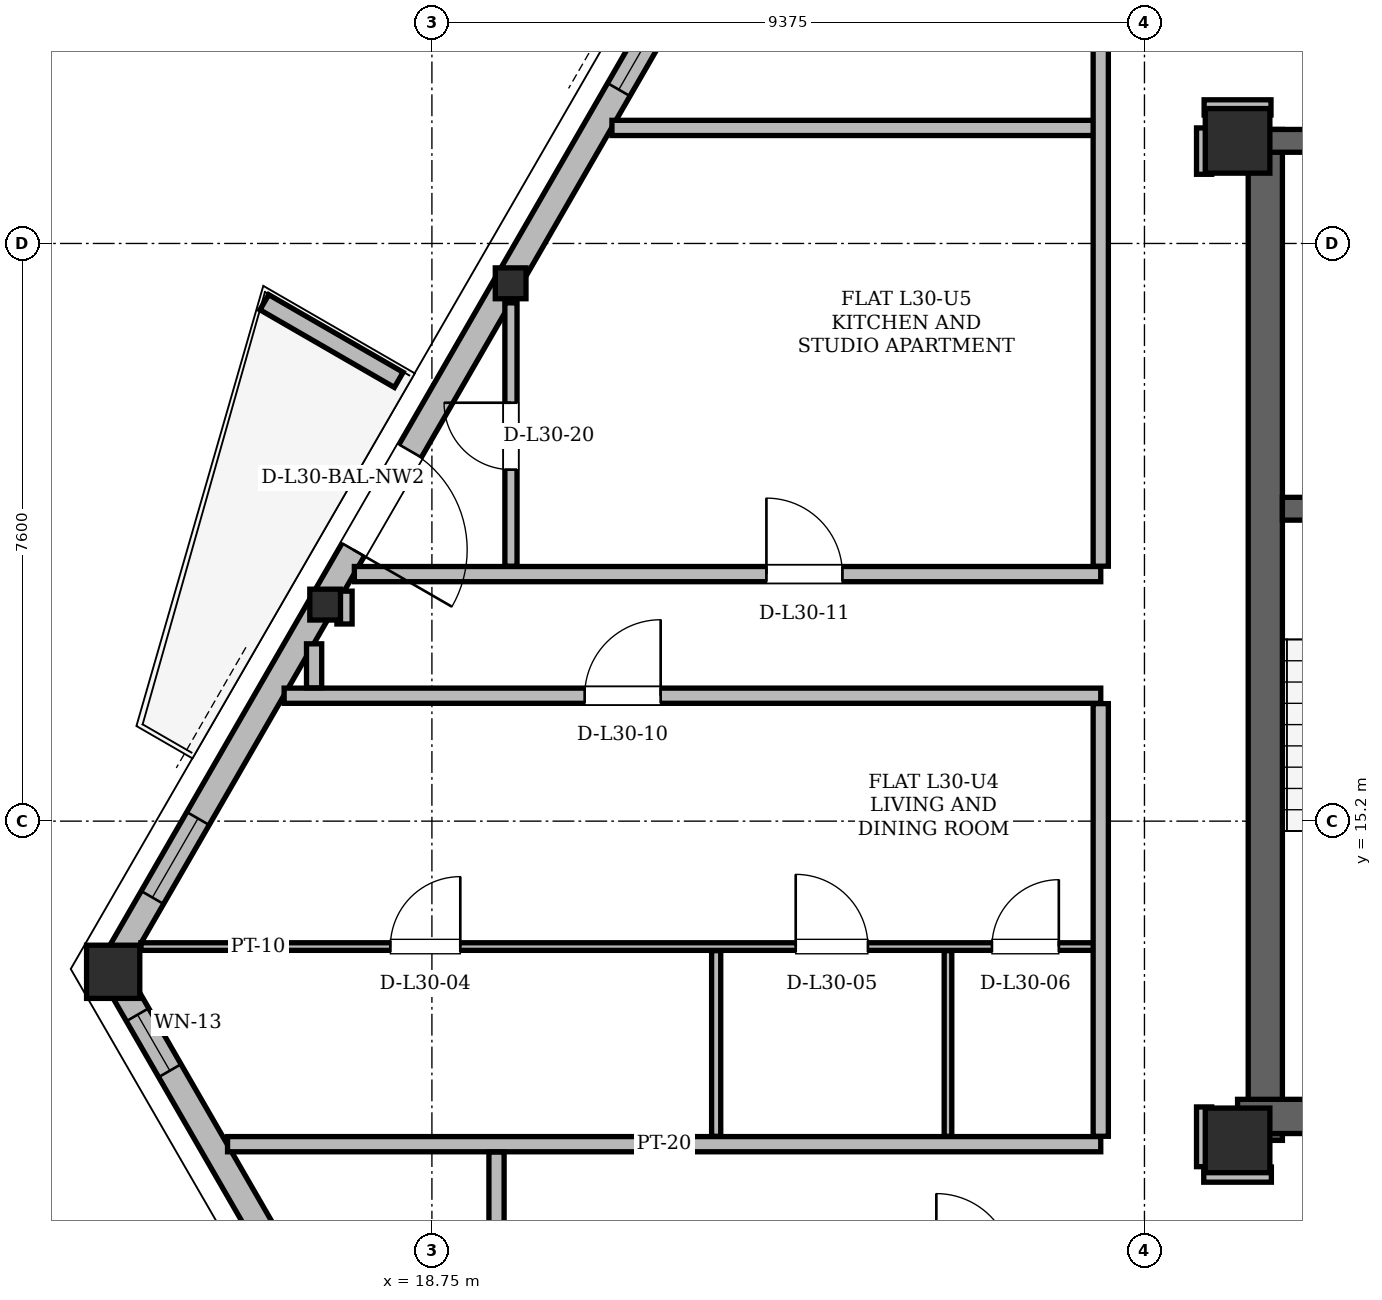
"""IFC4 building model, lengths in metres.
Left out: names, types, materials, properties, quantities, classifications, styles, units other than length and angle.
Written with IfcOpenShell. Run it as: python <this file> out.ifc"""

import sys

from ifc_helpers import new_model, si_unit, direction, frame, frame_2d, origin, origin_2d, place, context, subcontext, project, spatial, polyline, rectangle, hollow_rectangle, i_section, outline, extrude, element, fill, save


model = new_model("IFC4")
c1 = context("Model", 3, precision=1e-05, world=origin(), true_north=direction((0.0, 1.0)))
c2 = subcontext(c1, "Body", "Model", "MODEL_VIEW")
j1 = project(units=[si_unit("LENGTHUNIT", "METRE"), si_unit("PLANEANGLEUNIT", "RADIAN")], contexts=[c1])
p1 = place(None, origin())
s1 = spatial("IfcSite", under=j1, at=p1, CompositionType="ELEMENT")
p2 = place(p1, origin())
s2 = spatial("IfcBuilding", under=s1, at=p2, CompositionType="ELEMENT")
p3 = place(p2, frame((0.0, 0.0, 115.8)))
s3 = spatial("IfcBuildingStorey", under=s2, at=p3, CompositionType="ELEMENT", Elevation=115.8)
for number, where, z_axis, x_axis in (
    (1, (29.35, 11.0, 0.0), (0.0, 0.0, 1.0), (1.0, 0.0, 0.0)),
    (2, (29.35, 24.15, 0.0), (0.0, 0.0, 1.0), (1.0, 0.0, 0.0)),
):
    element("IfcColumn", number, at=place(p3, frame(where, z_axis=z_axis, x_axis=x_axis)), inside=s3, PredefinedType="COLUMN", context=c2, shape_type="SweptSolid", body=[
        extrude(hollow_rectangle(XDim=0.85, YDim=0.85, WallThickness=0.07, at=origin_2d()), origin(), (0.0, 0.0, 1.0), 3.6),
    ])
p4 = place(p3, frame((14.529, 13.255, 0.004), z_axis=(0.015019891197, -0.020728809118, 0.999672305979), x_axis=(0.809768124835, 0.586750018323, 0.0)))
e3 = element("IfcColumn", 3, at=p4, inside=s3, PredefinedType="COLUMN", context=c2, shape_type="SweptSolid", body=[
    extrude(hollow_rectangle(XDim=0.7, YDim=0.7, WallThickness=0.055, at=origin_2d()), origin(), (0.0, 0.0, 1.0), 3.592),
])
for number, where, z_axis, x_axis in (
    (4, (19.753, 22.303, 0.004), (0.018, -0.015, 1.0), (0.646, 0.763, 0.0)),
    (5, (17.315, 18.081, 0.004), (0.017, -0.018, 1.0), (0.73, 0.683, 0.0)),
):
    element("IfcColumn", number, at=place(p3, frame(where, z_axis=z_axis, x_axis=x_axis)), inside=s3, PredefinedType="COLUMN", context=c2, shape_type="SweptSolid", body=[
        extrude(i_section(OverallWidth=0.404, OverallDepth=0.406, WebThickness=0.027, FlangeThickness=0.044, at=origin_2d()), origin(), (0.0, 0.0, 1.0), 3.592),
    ])
p5 = place(p3, frame((29.715, 11.0, 0.0), z_axis=(0.0, 0.0, 1.0), x_axis=(0.0, 1.0, 0.0)))
e6 = element("IfcWall", 6, at=p5, inside=s3, PredefinedType="SHEAR", context=c2, shape_type="SweptSolid", body=[
    extrude(rectangle(XDim=13.3, YDim=0.45, at=frame_2d((6.65, 0.0))), origin(), (0.0, 0.0, 1.0), 3.36),
])
p6 = place(p3, frame((29.35, 11.315, 0.0), z_axis=(0.0, 0.0, 1.0), x_axis=(1.0, 0.0, 0.0)))
e7 = element("IfcWall", 7, at=p6, inside=s3, PredefinedType="SHEAR", context=c2, shape_type="SweptSolid", body=[
    extrude(rectangle(XDim=7.1, YDim=0.45, at=frame_2d((3.55, 0.0))), origin(), (0.0, 0.0, 1.0), 3.36),
])
p7 = place(p3, frame((29.65, 24.15, 0.0), z_axis=(0.0, 0.0, 1.0), x_axis=(1.0, 0.0, 0.0)))
e8 = element("IfcWall", 8, at=p7, inside=s3, PredefinedType="SHEAR", context=c2, shape_type="SweptSolid", body=[
    extrude(rectangle(XDim=15.7, YDim=0.3, at=frame_2d((7.85, 0.0))), origin(), (0.0, 0.0, 1.0), 3.36),
])
p8 = place(p7, frame((1.7, 0.0, 0.0)))
e9 = element("IfcOpeningElement", 9, at=p8, cuts=e8, PredefinedType="OPENING", context=c2, shape_type="SweptSolid", body=[
    extrude(rectangle(XDim=1.2, YDim=2.2, at=frame_2d((0.6, 1.1))), frame((0.0, 0.15, 0.0), z_axis=(0.0, -1.0, 0.0), x_axis=(1.0, 0.0, 0.0)), (0.0, 0.0, 1.0), 0.3),
])
p9 = place(p7, frame((12.8, 0.0, 0.0)))
e10 = element("IfcOpeningElement", 10, at=p9, cuts=e8, PredefinedType="OPENING", context=c2, shape_type="SweptSolid", body=[
    extrude(rectangle(XDim=1.2, YDim=2.2, at=frame_2d((0.6, 1.1))), frame((0.0, 0.15, 0.0), z_axis=(0.0, -1.0, 0.0), x_axis=(1.0, 0.0, 0.0)), (0.0, 0.0, 1.0), 0.3),
])
p10 = place(p7, frame((6.55, 0.0, 0.0)))
e11 = element("IfcOpeningElement", 11, at=p10, cuts=e8, PredefinedType="OPENING", context=c2, shape_type="SweptSolid", body=[
    extrude(rectangle(XDim=0.9, YDim=2.05, at=frame_2d((0.45, 1.025))), frame((0.0, 0.15, 0.0), z_axis=(0.0, -1.0, 0.0), x_axis=(1.0, 0.0, 0.0)), (0.0, 0.0, 1.0), 0.3),
])
p11 = place(p7, frame((8.45, 0.0, 0.0)))
e12 = element("IfcOpeningElement", 12, at=p11, cuts=e8, PredefinedType="OPENING", context=c2, shape_type="SweptSolid", body=[
    extrude(rectangle(XDim=0.9, YDim=2.05, at=frame_2d((0.45, 1.025))), frame((0.0, 0.15, 0.0), z_axis=(0.0, -1.0, 0.0), x_axis=(1.0, 0.0, 0.0)), (0.0, 0.0, 1.0), 0.3),
])
p12 = place(p3, frame((29.94, 19.31, 0.0), z_axis=(0.0, 0.0, 1.0), x_axis=(1.0, 0.0, 0.0)))
e13 = element("IfcWall", 13, at=p12, inside=s3, PredefinedType="SHEAR", context=c2, shape_type="SweptSolid", body=[
    extrude(rectangle(XDim=4.01, YDim=0.3, at=frame_2d((2.005, 0.0))), origin(), (0.0, 0.0, 1.0), 3.36),
])
p13 = place(p12, frame((1.01, 0.0, 0.0)))
e14 = element("IfcOpeningElement", 14, at=p13, cuts=e13, PredefinedType="OPENING", context=c2, shape_type="SweptSolid", body=[
    extrude(rectangle(XDim=1.4, YDim=2.2, at=frame_2d((0.7, 1.1))), frame((0.0, 0.15, 0.0), z_axis=(0.0, -1.0, 0.0), x_axis=(1.0, 0.0, 0.0)), (0.0, 0.0, 1.0), 0.3),
])
p14 = place(p3, frame((14.529, 13.255, 0.0), z_axis=(0.0, 0.0, 1.0), x_axis=(0.500013359164, -0.86601769073, 0.0)))
e15 = element("IfcWall", 15, at=p14, inside=s3, PredefinedType="SOLIDWALL", context=c2, shape_type="SweptSolid", body=[
    extrude(rectangle(XDim=11.115, YDim=0.34, at=frame_2d((5.558, 0.0))), origin(), (0.0, 0.0, 1.0), 2.578),
])
p15 = place(p14, frame((0.695, 0.0, 1.28)))
e16 = element("IfcOpeningElement", 16, at=p15, cuts=e15, PredefinedType="OPENING", context=c2, shape_type="SweptSolid", body=[
    extrude(rectangle(XDim=0.85, YDim=0.92, at=frame_2d((0.425, 0.46))), frame((0.0, 0.17, 0.0), z_axis=(0.0, -1.0, 0.0), x_axis=(1.0, 0.0, 0.0)), (0.0, 0.0, 1.0), 0.34),
])
p16 = place(p3, frame((22.261, 26.646, 0.0), z_axis=(0.0, 0.0, 1.0), x_axis=(-0.500009004027, -0.866020205245, 0.0)))
e17 = element("IfcWall", 17, at=p16, inside=s3, PredefinedType="SOLIDWALL", context=c2, shape_type="SweptSolid", body=[
    extrude(rectangle(XDim=15.463, YDim=0.34, at=frame_2d((7.731, 0.0))), origin(), (0.0, 0.0, 1.0), 2.578),
])
p17 = place(p16, frame((7.594, 0.0, 0.0)))
e18 = element("IfcOpeningElement", 18, at=p17, cuts=e17, PredefinedType="OPENING", context=c2, shape_type="SweptSolid", body=[
    extrude(rectangle(XDim=1.5, YDim=2.2, at=frame_2d((0.75, 1.1))), frame((0.0, 0.17, 0.0), z_axis=(0.0, -1.0, 0.0), x_axis=(1.0, 0.0, 0.0)), (0.0, 0.0, 1.0), 0.34),
])
p18 = place(p16, frame((13.177, 0.0, 0.85)))
e19 = element("IfcOpeningElement", 19, at=p18, cuts=e17, PredefinedType="OPENING", context=c2, shape_type="SweptSolid", body=[
    extrude(rectangle(XDim=1.2, YDim=1.48, at=frame_2d((0.6, 0.74))), frame((0.0, 0.17, 0.0), z_axis=(0.0, -1.0, 0.0), x_axis=(1.0, 0.0, 0.0)), (0.0, 0.0, 1.0), 0.34),
])
p19 = place(p16, frame((0.905, 0.0, 0.85)))
e20 = element("IfcOpeningElement", 20, at=p19, cuts=e17, PredefinedType="OPENING", context=c2, shape_type="SweptSolid", body=[
    extrude(rectangle(XDim=1.2, YDim=1.48, at=frame_2d((0.6, 0.74))), frame((0.0, 0.17, 0.0), z_axis=(0.0, -1.0, 0.0), x_axis=(1.0, 0.0, 0.0)), (0.0, 0.0, 1.0), 0.34),
])
p20 = place(p3, frame((18.314, 21.006, 0.0), z_axis=(0.0, 0.0, 1.0), x_axis=(-0.866012356593, 0.500022597718, 0.0)))
e21 = element("IfcWall", 21, at=p20, inside=s3, PredefinedType="PARAPET", context=c2, shape_type="SweptSolid", body=[
    extrude(outline(polyline([(0.0, 0.0), (2.042, 0.0), (2.042, 1.1), (0.0, 1.32), (0.0, 0.0)])), frame((0.0, 0.115, 0.0), z_axis=(0.0, -1.0, 0.0), x_axis=(1.0, 0.0, 0.0)), (0.0, 0.0, 1.0), 0.23),
])
p21 = place(p3, frame((28.905, 10.55, 0.0), z_axis=(0.0, 0.0, 1.0), x_axis=(1.0, 0.0, 0.0)))
e22 = element("IfcWall", 22, at=p21, inside=s3, PredefinedType="PARTITIONING", context=c2, shape_type="SweptSolid", body=[
    extrude(rectangle(XDim=0.89, YDim=0.2, at=frame_2d((0.445, 0.0))), origin(), (0.0, 0.0, 1.0), 3.36),
])
p22 = place(p3, frame((16.061, 10.95, 0.0), z_axis=(0.0, 0.0, 1.0), x_axis=(1.0, 0.0, 0.0)))
e23 = element("IfcWall", 23, at=p22, inside=s3, PredefinedType="PARTITIONING", context=c2, shape_type="SweptSolid", body=[
    extrude(rectangle(XDim=11.489, YDim=0.2, at=frame_2d((5.744, 0.0))), origin(), (0.0, 0.0, 1.0), 3.36),
])
p23 = place(p3, frame((14.921, 13.55, 0.0), z_axis=(0.0, 0.0, 1.0), x_axis=(1.0, 0.0, 0.0)))
e24 = element("IfcWall", 24, at=p23, inside=s3, PredefinedType="PARTITIONING", context=c2, shape_type="SweptSolid", body=[
    extrude(rectangle(XDim=12.679, YDim=0.1, at=frame_2d((6.339, 0.0))), origin(), (0.0, 0.0, 1.0), 3.36),
])
p24 = place(p23, frame((3.282, 0.0, 0.0)))
e25 = element("IfcOpeningElement", 25, at=p24, cuts=e24, PredefinedType="OPENING", context=c2, shape_type="SweptSolid", body=[
    extrude(rectangle(XDim=0.92, YDim=2.12, at=frame_2d((0.46, 1.06))), frame((0.0, 0.05, 0.0), z_axis=(0.0, -1.0, 0.0), x_axis=(1.0, 0.0, 0.0)), (0.0, 0.0, 1.0), 0.1),
])
p25 = place(p23, frame((8.615, 0.0, 0.0)))
e26 = element("IfcOpeningElement", 26, at=p25, cuts=e24, PredefinedType="OPENING", context=c2, shape_type="SweptSolid", body=[
    extrude(rectangle(XDim=0.95, YDim=2.1, at=frame_2d((0.475, 1.05))), frame((0.0, 0.05, 0.0), z_axis=(0.0, -1.0, 0.0), x_axis=(1.0, 0.0, 0.0)), (0.0, 0.0, 1.0), 0.1),
])
p26 = place(p23, frame((11.197, 0.0, 0.0)))
e27 = element("IfcOpeningElement", 27, at=p26, cuts=e24, PredefinedType="OPENING", context=c2, shape_type="SweptSolid", body=[
    extrude(rectangle(XDim=0.88, YDim=2.08, at=frame_2d((0.44, 1.04))), frame((0.0, 0.05, 0.0), z_axis=(0.0, -1.0, 0.0), x_axis=(1.0, 0.0, 0.0)), (0.0, 0.0, 1.0), 0.1),
])
p27 = place(p3, frame((16.806, 16.85, 0.0), z_axis=(0.0, 0.0, 1.0), x_axis=(1.0, 0.0, 0.0)))
e28 = element("IfcWall", 28, at=p27, inside=s3, PredefinedType="PARTITIONING", context=c2, shape_type="SweptSolid", body=[
    extrude(rectangle(XDim=10.744, YDim=0.2, at=frame_2d((5.372, 0.0))), origin(), (0.0, 0.0, 1.0), 3.36),
])
p28 = place(p27, frame((3.954, 0.0, 0.0)))
e29 = element("IfcOpeningElement", 29, at=p28, cuts=e28, PredefinedType="OPENING", context=c2, shape_type="SweptSolid", body=[
    extrude(rectangle(XDim=1.0, YDim=2.18, at=frame_2d((0.5, 1.09))), frame((0.0, 0.1, 0.0), z_axis=(0.0, -1.0, 0.0), x_axis=(1.0, 0.0, 0.0)), (0.0, 0.0, 1.0), 0.2),
])
p29 = place(p3, frame((17.729, 18.45, 0.0), z_axis=(0.0, 0.0, 1.0), x_axis=(1.0, 0.0, 0.0)))
e30 = element("IfcWall", 30, at=p29, inside=s3, PredefinedType="PARTITIONING", context=c2, shape_type="SweptSolid", body=[
    extrude(rectangle(XDim=9.821, YDim=0.2, at=frame_2d((4.91, 0.0))), origin(), (0.0, 0.0, 1.0), 3.36),
])
p30 = place(p29, frame((5.421, 0.0, 0.0)))
e31 = element("IfcOpeningElement", 31, at=p30, cuts=e30, PredefinedType="OPENING", context=c2, shape_type="SweptSolid", body=[
    extrude(rectangle(XDim=1.0, YDim=2.18, at=frame_2d((0.5, 1.09))), frame((0.0, 0.1, 0.0), z_axis=(0.0, -1.0, 0.0), x_axis=(1.0, 0.0, 0.0)), (0.0, 0.0, 1.0), 0.2),
])
p31 = place(p3, frame((21.119, 24.32, 0.0), z_axis=(0.0, 0.0, 1.0), x_axis=(1.0, 0.0, 0.0)))
e32 = element("IfcWall", 32, at=p31, inside=s3, PredefinedType="PARTITIONING", context=c2, shape_type="SweptSolid", body=[
    extrude(rectangle(XDim=6.431, YDim=0.2, at=frame_2d((3.216, 0.0))), origin(), (0.0, 0.0, 1.0), 3.36),
])
p32 = place(p3, frame((28.91, 24.59, 0.0), z_axis=(0.0, 0.0, 1.0), x_axis=(1.0, 0.0, 0.0)))
e33 = element("IfcWall", 33, at=p32, inside=s3, PredefinedType="PARTITIONING", context=c2, shape_type="SweptSolid", body=[
    extrude(rectangle(XDim=0.88, YDim=0.2, at=frame_2d((0.44, 0.0))), origin(), (0.0, 0.0, 1.0), 2.814),
])
p33 = place(p3, frame((17.2, 16.954, 0.0), z_axis=(0.0, 0.0, 1.0), x_axis=(0.0, 1.0, 0.0)))
e34 = element("IfcWall", 34, at=p33, inside=s3, PredefinedType="PARTITIONING", context=c2, shape_type="SweptSolid", body=[
    extrude(rectangle(XDim=0.579, YDim=0.2, at=frame_2d((0.289, 0.0))), origin(), (0.0, 0.0, 1.0), 2.578),
])
p34 = place(p3, frame((17.6, 17.794, 0.0), z_axis=(0.0, 0.0, 1.0), x_axis=(0.0, 1.0, 0.0)))
e35 = element("IfcWall", 35, at=p34, inside=s3, PredefinedType="PARTITIONING", context=c2, shape_type="SweptSolid", body=[
    extrude(rectangle(XDim=0.432, YDim=0.2, at=frame_2d((0.216, 0.0))), origin(), (0.0, 0.0, 1.0), 2.578),
])
p35 = place(p3, frame((19.6, 9.404, 0.0), z_axis=(0.0, 0.0, 1.0), x_axis=(0.0, 1.0, 0.0)))
e36 = element("IfcWall", 36, at=p35, inside=s3, PredefinedType="PARTITIONING", context=c2, shape_type="SweptSolid", body=[
    extrude(rectangle(XDim=1.442, YDim=0.2, at=frame_2d((0.721, 0.0))), origin(), (0.0, 0.0, 1.0), 3.36),
])
p36 = place(p3, frame((19.79, 18.554, 0.0), z_axis=(0.0, 0.0, 1.0), x_axis=(0.0, 1.0, 0.0)))
e37 = element("IfcWall", 37, at=p36, inside=s3, PredefinedType="PARTITIONING", context=c2, shape_type="SweptSolid", body=[
    extrude(rectangle(XDim=3.465, YDim=0.16, at=frame_2d((1.732, 0.0))), origin(), (0.0, 0.0, 1.0), 2.578),
])
p37 = place(p36, frame((1.271, 0.0, 0.0)))
e38 = element("IfcOpeningElement", 38, at=p37, cuts=e37, PredefinedType="OPENING", context=c2, shape_type="SweptSolid", body=[
    extrude(rectangle(XDim=0.88, YDim=2.08, at=frame_2d((0.44, 1.04))), frame((0.0, 0.08, 0.0), z_axis=(0.0, -1.0, 0.0), x_axis=(1.0, 0.0, 0.0)), (0.0, 0.0, 1.0), 0.16),
])
p38 = place(p3, frame((22.49, 11.054, 0.0), z_axis=(0.0, 0.0, 1.0), x_axis=(0.0, 1.0, 0.0)))
e39 = element("IfcWall", 39, at=p38, inside=s3, PredefinedType="PARTITIONING", context=c2, shape_type="SweptSolid", body=[
    extrude(rectangle(XDim=2.442, YDim=0.12, at=frame_2d((1.221, 0.0))), origin(), (0.0, 0.0, 1.0), 2.814),
])
p39 = place(p3, frame((25.54, 11.054, 0.0), z_axis=(0.0, 0.0, 1.0), x_axis=(0.0, 1.0, 0.0)))
e40 = element("IfcWall", 40, at=p39, inside=s3, PredefinedType="PARTITIONING", context=c2, shape_type="SweptSolid", body=[
    extrude(rectangle(XDim=2.442, YDim=0.1, at=frame_2d((1.221, 0.0))), origin(), (0.0, 0.0, 1.0), 2.814),
])
p40 = place(p3, frame((27.55, 11.054, 0.0), z_axis=(0.0, 0.0, 1.0), x_axis=(0.0, 1.0, 0.0)))
e41 = element("IfcWall", 41, at=p40, inside=s3, PredefinedType="PARTITIONING", context=c2, shape_type="SweptSolid", body=[
    extrude(rectangle(XDim=5.692, YDim=0.2, at=frame_2d((2.846, 0.0))), origin(), (0.0, 0.0, 1.0), 2.814),
])
p41 = place(p3, frame((27.55, 18.554, 0.0), z_axis=(0.0, 0.0, 1.0), x_axis=(0.0, 1.0, 0.0)))
e42 = element("IfcWall", 42, at=p41, inside=s3, PredefinedType="PARTITIONING", context=c2, shape_type="SweptSolid", body=[
    extrude(rectangle(XDim=7.312, YDim=0.2, at=frame_2d((3.656, 0.0))), origin(), (0.0, 0.0, 1.0), 3.36),
])
p42 = place(p3, frame((28.91, 10.654, 0.0), z_axis=(0.0, 0.0, 1.0), x_axis=(0.0, 1.0, 0.0)))
e43 = element("IfcWall", 43, at=p42, inside=s3, PredefinedType="PARTITIONING", context=c2, shape_type="SweptSolid", body=[
    extrude(rectangle(XDim=0.786, YDim=0.2, at=frame_2d((0.393, 0.0))), origin(), (0.0, 0.0, 1.0), 2.814),
])
p43 = place(p3, frame((28.91, 23.71, 0.0), z_axis=(0.0, 0.0, 1.0), x_axis=(0.0, 1.0, 0.0)))
e44 = element("IfcWall", 44, at=p43, inside=s3, PredefinedType="PARTITIONING", context=c2, shape_type="SweptSolid", body=[
    extrude(rectangle(XDim=0.61, YDim=0.2, at=frame_2d((0.305, 0.0))), origin(), (0.0, 0.0, 1.0), 3.36),
])
p44 = place(p17, origin())
e45 = element("IfcDoor", 45, at=p44, inside=s3, OperationType="SINGLE_SWING_RIGHT", PredefinedType="DOOR", context=c2, shape_type="SweptSolid", body=[
    extrude(rectangle(XDim=1.5, YDim=2.2, at=frame_2d((0.75, 1.1))), frame((0.0, 0.025, 0.0), z_axis=(0.0, -1.0, 0.0), x_axis=(1.0, 0.0, 0.0)), (0.0, 0.0, 1.0), 0.05),
])
fill(e18, e45)
p45 = place(p18, origin())
e46 = element("IfcWindow", 46, at=p45, inside=s3, PartitioningType="SINGLE_PANEL", PredefinedType="WINDOW", context=c2, shape_type="SweptSolid", body=[
    extrude(rectangle(XDim=1.2, YDim=1.48, at=frame_2d((0.6, 0.74))), frame((0.0, 0.03, 0.0), z_axis=(0.0, -1.0, 0.0), x_axis=(1.0, 0.0, 0.0)), (0.0, 0.0, 1.0), 0.06),
])
fill(e19, e46)
p46 = place(p19, origin())
e47 = element("IfcWindow", 47, at=p46, inside=s3, PartitioningType="SINGLE_PANEL", PredefinedType="WINDOW", context=c2, shape_type="SweptSolid", body=[
    extrude(rectangle(XDim=1.2, YDim=1.48, at=frame_2d((0.6, 0.74))), frame((0.0, 0.03, 0.0), z_axis=(0.0, -1.0, 0.0), x_axis=(1.0, 0.0, 0.0)), (0.0, 0.0, 1.0), 0.06),
])
fill(e20, e47)
p47 = place(p15, origin())
e48 = element("IfcWindow", 48, at=p47, inside=s3, PartitioningType="SINGLE_PANEL", PredefinedType="WINDOW", context=c2, shape_type="SweptSolid", body=[
    extrude(rectangle(XDim=0.85, YDim=0.92, at=frame_2d((0.425, 0.46))), frame((0.0, 0.03, 0.0), z_axis=(0.0, -1.0, 0.0), x_axis=(1.0, 0.0, 0.0)), (0.0, 0.0, 1.0), 0.06),
])
fill(e16, e48)
p48 = place(p24, origin())
e49 = element("IfcDoor", 49, at=p48, inside=s3, OperationType="SINGLE_SWING_RIGHT", PredefinedType="DOOR", context=c2, shape_type="SweptSolid", body=[
    extrude(rectangle(XDim=0.92, YDim=2.12, at=frame_2d((0.46, 1.06))), frame((0.0, 0.025, 0.0), z_axis=(0.0, -1.0, 0.0), x_axis=(1.0, 0.0, 0.0)), (0.0, 0.0, 1.0), 0.05),
])
fill(e25, e49)
p49 = place(p25, origin())
e50 = element("IfcDoor", 50, at=p49, inside=s3, OperationType="SINGLE_SWING_LEFT", PredefinedType="DOOR", context=c2, shape_type="SweptSolid", body=[
    extrude(rectangle(XDim=0.95, YDim=2.1, at=frame_2d((0.475, 1.05))), frame((0.0, 0.025, 0.0), z_axis=(0.0, -1.0, 0.0), x_axis=(1.0, 0.0, 0.0)), (0.0, 0.0, 1.0), 0.05),
])
fill(e26, e50)
p50 = place(p26, origin())
e51 = element("IfcDoor", 51, at=p50, inside=s3, OperationType="SINGLE_SWING_RIGHT", PredefinedType="DOOR", context=c2, shape_type="SweptSolid", body=[
    extrude(rectangle(XDim=0.88, YDim=2.08, at=frame_2d((0.44, 1.04))), frame((0.0, 0.025, 0.0), z_axis=(0.0, -1.0, 0.0), x_axis=(1.0, 0.0, 0.0)), (0.0, 0.0, 1.0), 0.05),
])
fill(e27, e51)
p51 = place(p28, origin())
e52 = element("IfcDoor", 52, at=p51, inside=s3, OperationType="SINGLE_SWING_RIGHT", PredefinedType="DOOR", context=c2, shape_type="SweptSolid", body=[
    extrude(rectangle(XDim=1.0, YDim=2.18, at=frame_2d((0.5, 1.09))), frame((0.0, 0.025, 0.0), z_axis=(0.0, -1.0, 0.0), x_axis=(1.0, 0.0, 0.0)), (0.0, 0.0, 1.0), 0.05),
])
fill(e29, e52)
p52 = place(p30, origin())
e53 = element("IfcDoor", 53, at=p52, inside=s3, OperationType="SINGLE_SWING_LEFT", PredefinedType="DOOR", context=c2, shape_type="SweptSolid", body=[
    extrude(rectangle(XDim=1.0, YDim=2.18, at=frame_2d((0.5, 1.09))), frame((0.0, 0.025, 0.0), z_axis=(0.0, -1.0, 0.0), x_axis=(1.0, 0.0, 0.0)), (0.0, 0.0, 1.0), 0.05),
])
fill(e31, e53)
p53 = place(p37, origin())
e54 = element("IfcDoor", 54, at=p53, inside=s3, OperationType="SINGLE_SWING_RIGHT", PredefinedType="DOOR", context=c2, shape_type="SweptSolid", body=[
    extrude(rectangle(XDim=0.88, YDim=2.08, at=frame_2d((0.44, 1.04))), frame((0.0, 0.025, 0.0), z_axis=(0.0, -1.0, 0.0), x_axis=(1.0, 0.0, 0.0)), (0.0, 0.0, 1.0), 0.05),
])
fill(e38, e54)
save(model, sys.argv[1])
